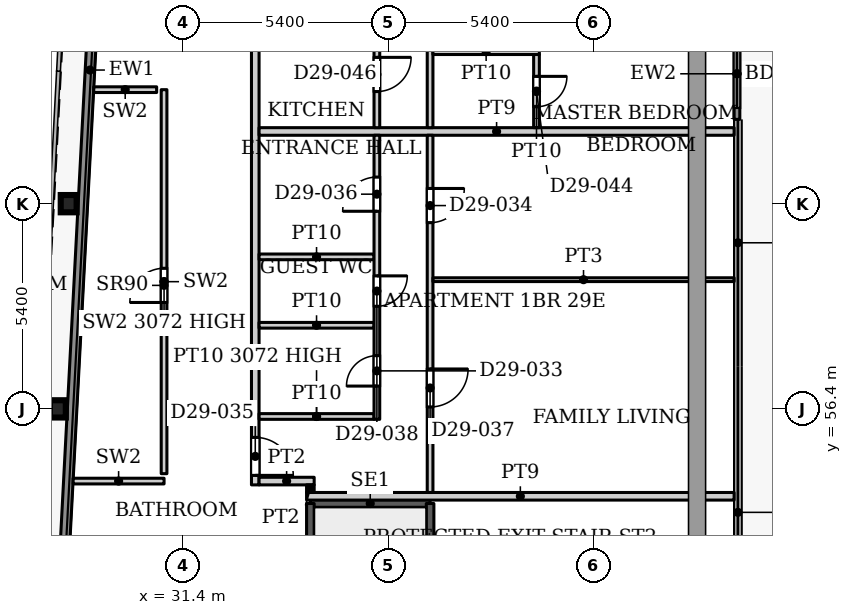
"""IFC4 building model, lengths in metres.
Left out: names, types, materials, properties, quantities, classifications, styles, units other than length and angle.
Written with IfcOpenShell. Run it as: python <this file> out.ifc"""

import sys

from ifc_helpers import new_model, si_unit, direction, frame, frame_2d, origin, origin_2d, place, context, subcontext, project, spatial, rectangle, i_section, extrude, source, transform, mapped, element, fill, save


model = new_model("IFC4")
c1 = context("Model", 3, precision=1e-05, world=origin(), true_north=direction((0.0, 1.0)))
c2 = subcontext(c1, "Body", "Model", "MODEL_VIEW")
j1 = project(units=[si_unit("LENGTHUNIT", "METRE"), si_unit("PLANEANGLEUNIT", "RADIAN")], contexts=[c1])
p1 = place(None, origin())
s1 = spatial("IfcSite", under=j1, at=p1, CompositionType="ELEMENT")
p2 = place(p1, origin())
s2 = spatial("IfcBuilding", under=s1, at=p2, CompositionType="ELEMENT")
p3 = place(p2, frame((0.0, 0.0, 125.3)))
s3 = spatial("IfcBuildingStorey", under=s2, at=p3, CompositionType="ELEMENT", Elevation=125.3)
for number, where, z_axis, x_axis in (
    (1, (28.106, 56.4, 0.0), (0.0, 0.0, 1.0), (1.0, 0.0, 0.0)),
    (2, (28.39, 61.8, 0.0), (0.0, 0.0, 1.0), (1.0, 0.0, 0.0)),
):
    element("IfcColumn", number, at=place(p3, frame(where, z_axis=z_axis, x_axis=x_axis)), inside=s3, PredefinedType="COLUMN", context=c2, shape_type="SweptSolid", body=[
        extrude(i_section(OverallWidth=0.418, OverallDepth=0.455, WebThickness=0.042, FlangeThickness=0.068, FilletRadius=0.014, at=origin_2d()), origin(), (0.0, 0.0, 1.0), 3.9),
    ])
p4 = place(p3, frame((27.195, 31.969, 0.0), z_axis=(0.0, 0.0, 1.0), x_axis=(0.052554995867, 0.998618031286, 0.0)))
e3 = element("IfcWall", 3, at=p4, inside=s3, PredefinedType="SOLIDWALL", context=c2, shape_type="SweptSolid", body=[
    extrude(rectangle(XDim=66.787, YDim=0.25, at=frame_2d((33.394, 0.0))), origin(), (0.0, 0.0, 1.0), 3.75),
])
p5 = place(p3, frame((45.975, 66.418, 0.0), z_axis=(0.0, 0.0, 1.0), x_axis=(0.0, -1.0, 0.0)))
e4 = element("IfcWall", 4, at=p5, inside=s3, PredefinedType="SOLIDWALL", context=c2, shape_type="SweptSolid", body=[
    extrude(rectangle(XDim=2.4, YDim=0.15, at=frame_2d((1.2, 0.0))), origin(), (0.0, 0.0, 1.0), 3.75),
])
p6 = place(p5, frame((0.3, 0.0, 0.0)))
e5 = element("IfcOpeningElement", 5, at=p6, cuts=e4, PredefinedType="OPENING", context=c2, shape_type="SweptSolid", body=[
    extrude(rectangle(XDim=1.8, YDim=2.4, at=frame_2d((0.9, 1.2))), frame((0.0, 0.085, 0.0), z_axis=(0.0, -1.0, 0.0), x_axis=(1.0, 0.0, 0.0)), (0.0, 0.0, 1.0), 0.17),
])
p7 = place(p3, frame((34.75, 53.91, 0.0), z_axis=(0.0, 0.0, 1.0), x_axis=(1.0, 0.0, 0.0)))
e6 = element("IfcWall", 6, at=p7, inside=s3, PredefinedType="SHEAR", context=c2, shape_type="SweptSolid", body=[
    extrude(rectangle(XDim=3.15, YDim=0.2, at=frame_2d((1.575, 0.0))), origin(), (0.0, 0.0, 1.0), 3.9),
])
p8 = place(p3, frame((34.75, 47.5, 0.0), z_axis=(0.0, 0.0, 1.0), x_axis=(0.0, 1.0, 0.0)))
e7 = element("IfcWall", 7, at=p8, inside=s3, PredefinedType="SHEAR", context=c2, shape_type="SweptSolid", body=[
    extrude(rectangle(XDim=6.41, YDim=0.2, at=frame_2d((3.205, 0.0))), origin(), (0.0, 0.0, 1.0), 3.9),
])
p9 = place(p3, frame((37.9, 44.75, 0.0), z_axis=(0.0, 0.0, 1.0), x_axis=(0.0, 1.0, 0.0)))
e8 = element("IfcWall", 8, at=p9, inside=s3, PredefinedType="SHEAR", context=c2, shape_type="SweptSolid", body=[
    extrude(rectangle(XDim=9.16, YDim=0.2, at=frame_2d((4.58, 0.0))), origin(), (0.0, 0.0, 1.0), 3.9),
])
p10 = place(p3, frame((28.508, 54.5, 0.0), z_axis=(0.0, 0.0, 1.0), x_axis=(1.0, 0.0, 0.0)))
e9 = element("IfcWall", 9, at=p10, inside=s3, PredefinedType="PARTITIONING", context=c2, shape_type="SweptSolid", body=[
    extrude(rectangle(XDim=2.392, YDim=0.15, at=frame_2d((1.196, 0.0))), origin(), (0.0, 0.0, 1.0), 3.9),
])
p11 = place(p3, frame((30.9, 54.695, 0.0), z_axis=(0.0, 0.0, 1.0), x_axis=(0.0, 1.0, 0.0)))
e10 = element("IfcWall", 10, at=p11, inside=s3, PredefinedType="PARTITIONING", context=c2, shape_type="SweptSolid", body=[
    extrude(rectangle(XDim=10.105, YDim=0.15, at=frame_2d((5.052, 0.0))), origin(), (0.0, 0.0, 1.0), 3.072),
])
p12 = place(p11, frame((4.505, 0.0, 0.0)))
e11 = element("IfcOpeningElement", 11, at=p12, cuts=e10, PredefinedType="OPENING", context=c2, shape_type="SweptSolid", body=[
    extrude(rectangle(XDim=0.9, YDim=2.2, at=frame_2d((0.45, 1.1))), frame((0.0, 0.085, 0.0), z_axis=(0.0, -1.0, 0.0), x_axis=(1.0, 0.0, 0.0)), (0.0, 0.0, 1.0), 0.17),
])
p13 = place(p3, frame((29.05, 64.8, 0.0), z_axis=(0.0, 0.0, 1.0), x_axis=(1.0, 0.0, 0.0)))
e12 = element("IfcWall", 12, at=p13, inside=s3, PredefinedType="PARTITIONING", context=c2, shape_type="SweptSolid", body=[
    extrude(rectangle(XDim=1.655, YDim=0.15, at=frame_2d((0.828, 0.0))), origin(), (0.0, 0.0, 1.0), 3.9),
])
p14 = place(p3, frame((33.3, 54.4, 0.0), z_axis=(0.0, 0.0, 1.0), x_axis=(0.0, 1.0, 0.0)))
e13 = element("IfcWall", 13, at=p14, inside=s3, PredefinedType="PARTITIONING", context=c2, shape_type="SweptSolid", body=[
    extrude(rectangle(XDim=24.95, YDim=0.2, at=frame_2d((12.475, 0.0))), origin(), (0.0, 0.0, 1.0), 3.6),
])
p15 = place(p14, frame((0.25, 0.0, 0.0)))
e14 = element("IfcOpeningElement", 14, at=p15, cuts=e13, PredefinedType="OPENING", context=c2, shape_type="SweptSolid", body=[
    extrude(rectangle(XDim=1.0, YDim=2.1, at=frame_2d((0.5, 1.05))), frame((0.0, 0.11, 0.0), z_axis=(0.0, -1.0, 0.0), x_axis=(1.0, 0.0, 0.0)), (0.0, 0.0, 1.0), 0.22),
])
p16 = place(p14, frame((20.5, 0.0, 0.0)))
e15 = element("IfcOpeningElement", 15, at=p16, cuts=e13, PredefinedType="OPENING", context=c2, shape_type="SweptSolid", body=[
    extrude(rectangle(XDim=1.0, YDim=2.1, at=frame_2d((0.5, 1.05))), frame((0.0, 0.11, 0.0), z_axis=(0.0, -1.0, 0.0), x_axis=(1.0, 0.0, 0.0)), (0.0, 0.0, 1.0), 0.22),
])
p17 = place(p3, frame((33.4, 54.5, 0.0), z_axis=(0.0, 0.0, 1.0), x_axis=(1.0, 0.0, 0.0)))
e16 = element("IfcWall", 16, at=p17, inside=s3, PredefinedType="PARTITIONING", context=c2, shape_type="SweptSolid", body=[
    extrude(rectangle(XDim=1.45, YDim=0.2, at=frame_2d((0.725, 0.0))), origin(), (0.0, 0.0, 1.0), 3.6),
])
p18 = place(p3, frame((33.4, 56.2, 0.0), z_axis=(0.0, 0.0, 1.0), x_axis=(1.0, 0.0, 0.0)))
e17 = element("IfcWall", 17, at=p18, inside=s3, PredefinedType="PARTITIONING", context=c2, shape_type="SweptSolid", body=[
    extrude(rectangle(XDim=3.025, YDim=0.15, at=frame_2d((1.513, 0.0))), origin(), (0.0, 0.0, 1.0), 3.072),
])
for number, where, z_axis, x_axis in (
    (18, (33.4, 58.6, 0.0), (0.0, 0.0, 1.0), (1.0, 0.0, 0.0)),
    (19, (33.4, 60.4, 0.0), (0.0, 0.0, 1.0), (1.0, 0.0, 0.0)),
):
    element("IfcWall", number, at=place(p3, frame(where, z_axis=z_axis, x_axis=x_axis)), inside=s3, PredefinedType="PARTITIONING", context=c2, shape_type="SweptSolid", body=[
        extrude(rectangle(XDim=3.025, YDim=0.15, at=frame_2d((1.513, 0.0))), origin(), (0.0, 0.0, 1.0), 3.6),
    ])
p19 = place(p3, frame((33.4, 63.7, 0.0), z_axis=(0.0, 0.0, 1.0), x_axis=(1.0, 0.0, 0.0)))
e20 = element("IfcWall", 20, at=p19, inside=s3, PredefinedType="PARTITIONING", context=c2, shape_type="SweptSolid", body=[
    extrude(rectangle(XDim=12.5, YDim=0.2, at=frame_2d((6.25, 0.0))), origin(), (0.0, 0.0, 1.0), 3.6),
])
p20 = place(p3, frame((34.65, 54.1, 0.0), z_axis=(0.0, 0.0, 1.0), x_axis=(1.0, 0.0, 0.0)))
e21 = element("IfcWall", 21, at=p20, inside=s3, PredefinedType="PARTITIONING", context=c2, shape_type="SweptSolid", body=[
    extrude(rectangle(XDim=11.25, YDim=0.2, at=frame_2d((5.625, 0.0))), origin(), (0.0, 0.0, 1.0), 3.6),
])
p21 = place(p3, frame((34.75, 54.2, 0.0), z_axis=(0.0, 0.0, 1.0), x_axis=(0.0, 1.0, 0.0)))
e22 = element("IfcWall", 22, at=p21, inside=s3, PredefinedType="PARTITIONING", context=c2, shape_type="SweptSolid", body=[
    extrude(rectangle(XDim=0.2, YDim=0.2, at=frame_2d((0.1, 0.0))), origin(), (0.0, 0.0, 1.0), 3.6),
])
p22 = place(p3, frame((36.5, 56.125, 0.0), z_axis=(0.0, 0.0, 1.0), x_axis=(0.0, 1.0, 0.0)))
e23 = element("IfcWall", 23, at=p22, inside=s3, PredefinedType="PARTITIONING", context=c2, shape_type="SweptSolid", body=[
    extrude(rectangle(XDim=7.475, YDim=0.15, at=frame_2d((3.738, 0.0))), origin(), (0.0, 0.0, 1.0), 3.6),
])
p23 = place(p22, frame((0.875, 0.0, 0.0)))
e24 = element("IfcOpeningElement", 24, at=p23, cuts=e23, PredefinedType="OPENING", context=c2, shape_type="SweptSolid", body=[
    extrude(rectangle(XDim=0.8, YDim=2.1, at=frame_2d((0.4, 1.05))), frame((0.0, 0.085, 0.0), z_axis=(0.0, -1.0, 0.0), x_axis=(1.0, 0.0, 0.0)), (0.0, 0.0, 1.0), 0.17),
])
p24 = place(p22, frame((5.475, 0.0, 0.0)))
e25 = element("IfcOpeningElement", 25, at=p24, cuts=e23, PredefinedType="OPENING", context=c2, shape_type="SweptSolid", body=[
    extrude(rectangle(XDim=0.9, YDim=2.1, at=frame_2d((0.45, 1.05))), frame((0.0, 0.085, 0.0), z_axis=(0.0, -1.0, 0.0), x_axis=(1.0, 0.0, 0.0)), (0.0, 0.0, 1.0), 0.17),
])
p25 = place(p22, frame((2.975, 0.0, 0.0)))
e26 = element("IfcOpeningElement", 26, at=p25, cuts=e23, PredefinedType="OPENING", context=c2, shape_type="SweptSolid", body=[
    extrude(rectangle(XDim=0.8, YDim=2.1, at=frame_2d((0.4, 1.05))), frame((0.0, 0.085, 0.0), z_axis=(0.0, -1.0, 0.0), x_axis=(1.0, 0.0, 0.0)), (0.0, 0.0, 1.0), 0.17),
])
p26 = place(p3, frame((36.5, 63.8, 0.0), z_axis=(0.0, 0.0, 1.0), x_axis=(0.0, 1.0, 0.0)))
e27 = element("IfcWall", 27, at=p26, inside=s3, PredefinedType="PARTITIONING", context=c2, shape_type="SweptSolid", body=[
    extrude(rectangle(XDim=10.75, YDim=0.15, at=frame_2d((5.375, 0.0))), origin(), (0.0, 0.0, 1.0), 3.6),
])
p27 = place(p26, frame((3.55, 0.0, 0.0)))
e28 = element("IfcOpeningElement", 28, at=p27, cuts=e27, PredefinedType="OPENING", context=c2, shape_type="SweptSolid", body=[
    extrude(rectangle(XDim=0.8, YDim=2.1, at=frame_2d((0.4, 1.05))), frame((0.0, 0.085, 0.0), z_axis=(0.0, -1.0, 0.0), x_axis=(1.0, 0.0, 0.0)), (0.0, 0.0, 1.0), 0.17),
])
p28 = place(p26, frame((5.65, 0.0, 0.0)))
e29 = element("IfcOpeningElement", 29, at=p28, cuts=e27, PredefinedType="OPENING", context=c2, shape_type="SweptSolid", body=[
    extrude(rectangle(XDim=0.8, YDim=2.1, at=frame_2d((0.4, 1.05))), frame((0.0, 0.085, 0.0), z_axis=(0.0, -1.0, 0.0), x_axis=(1.0, 0.0, 0.0)), (0.0, 0.0, 1.0), 0.17),
])
p29 = place(p26, frame((9.25, 0.0, 0.0)))
e30 = element("IfcOpeningElement", 30, at=p29, cuts=e27, PredefinedType="OPENING", context=c2, shape_type="SweptSolid", body=[
    extrude(rectangle(XDim=0.8, YDim=2.1, at=frame_2d((0.4, 1.05))), frame((0.0, 0.085, 0.0), z_axis=(0.0, -1.0, 0.0), x_axis=(1.0, 0.0, 0.0)), (0.0, 0.0, 1.0), 0.17),
])
p30 = place(p26, frame((0.95, 0.0, 0.0)))
e31 = element("IfcOpeningElement", 31, at=p30, cuts=e27, PredefinedType="OPENING", context=c2, shape_type="SweptSolid", body=[
    extrude(rectangle(XDim=0.9, YDim=2.1, at=frame_2d((0.45, 1.05))), frame((0.0, 0.085, 0.0), z_axis=(0.0, -1.0, 0.0), x_axis=(1.0, 0.0, 0.0)), (0.0, 0.0, 1.0), 0.17),
])
p31 = place(p26, frame((7.45, 0.0, 0.0)))
e32 = element("IfcOpeningElement", 32, at=p31, cuts=e27, PredefinedType="OPENING", context=c2, shape_type="SweptSolid", body=[
    extrude(rectangle(XDim=0.8, YDim=2.1, at=frame_2d((0.4, 1.05))), frame((0.0, 0.085, 0.0), z_axis=(0.0, -1.0, 0.0), x_axis=(1.0, 0.0, 0.0)), (0.0, 0.0, 1.0), 0.17),
])
p32 = place(p3, frame((37.9, 54.2, 0.0), z_axis=(0.0, 0.0, 1.0), x_axis=(0.0, 1.0, 0.0)))
e33 = element("IfcWall", 33, at=p32, inside=s3, PredefinedType="PARTITIONING", context=c2, shape_type="SweptSolid", body=[
    extrude(rectangle(XDim=9.4, YDim=0.15, at=frame_2d((4.7, 0.0))), origin(), (0.0, 0.0, 1.0), 3.6),
])
p33 = place(p32, frame((7.1, 0.0, 0.0)))
e34 = element("IfcOpeningElement", 34, at=p33, cuts=e33, PredefinedType="OPENING", context=c2, shape_type="SweptSolid", body=[
    extrude(rectangle(XDim=0.9, YDim=2.1, at=frame_2d((0.45, 1.05))), frame((0.0, 0.085, 0.0), z_axis=(0.0, -1.0, 0.0), x_axis=(1.0, 0.0, 0.0)), (0.0, 0.0, 1.0), 0.17),
])
p34 = place(p32, frame((2.25, 0.0, 0.0)))
e35 = element("IfcOpeningElement", 35, at=p34, cuts=e33, PredefinedType="OPENING", context=c2, shape_type="SweptSolid", body=[
    extrude(rectangle(XDim=1.0, YDim=2.1, at=frame_2d((0.5, 1.05))), frame((0.0, 0.085, 0.0), z_axis=(0.0, -1.0, 0.0), x_axis=(1.0, 0.0, 0.0)), (0.0, 0.0, 1.0), 0.17),
])
p35 = place(p3, frame((37.9, 63.8, 0.0), z_axis=(0.0, 0.0, 1.0), x_axis=(0.0, 1.0, 0.0)))
e36 = element("IfcWall", 36, at=p35, inside=s3, PredefinedType="PARTITIONING", context=c2, shape_type="SweptSolid", body=[
    extrude(rectangle(XDim=15.45, YDim=0.15, at=frame_2d((7.725, 0.0))), origin(), (0.0, 0.0, 1.0), 3.6),
])
p36 = place(p35, frame((11.0, 0.0, 0.0)))
e37 = element("IfcOpeningElement", 37, at=p36, cuts=e36, PredefinedType="OPENING", context=c2, shape_type="SweptSolid", body=[
    extrude(rectangle(XDim=0.9, YDim=2.1, at=frame_2d((0.45, 1.05))), frame((0.0, 0.085, 0.0), z_axis=(0.0, -1.0, 0.0), x_axis=(1.0, 0.0, 0.0)), (0.0, 0.0, 1.0), 0.17),
])
p37 = place(p35, frame((13.7, 0.0, 0.0)))
e38 = element("IfcOpeningElement", 38, at=p37, cuts=e36, PredefinedType="OPENING", context=c2, shape_type="SweptSolid", body=[
    extrude(rectangle(XDim=0.9, YDim=2.1, at=frame_2d((0.45, 1.05))), frame((0.0, 0.085, 0.0), z_axis=(0.0, -1.0, 0.0), x_axis=(1.0, 0.0, 0.0)), (0.0, 0.0, 1.0), 0.17),
])
p38 = place(p35, frame((4.65, 0.0, 0.0)))
e39 = element("IfcOpeningElement", 39, at=p38, cuts=e36, PredefinedType="OPENING", context=c2, shape_type="SweptSolid", body=[
    extrude(rectangle(XDim=1.0, YDim=2.1, at=frame_2d((0.5, 1.05))), frame((0.0, 0.085, 0.0), z_axis=(0.0, -1.0, 0.0), x_axis=(1.0, 0.0, 0.0)), (0.0, 0.0, 1.0), 0.17),
])
p39 = place(p35, frame((7.65, 0.0, 0.0)))
e40 = element("IfcOpeningElement", 40, at=p39, cuts=e36, PredefinedType="OPENING", context=c2, shape_type="SweptSolid", body=[
    extrude(rectangle(XDim=1.6, YDim=2.1, at=frame_2d((0.8, 1.05))), frame((0.0, 0.085, 0.0), z_axis=(0.0, -1.0, 0.0), x_axis=(1.0, 0.0, 0.0)), (0.0, 0.0, 1.0), 0.17),
])
p40 = place(p35, frame((2.3, 0.0, 0.0)))
e41 = element("IfcOpeningElement", 41, at=p40, cuts=e36, PredefinedType="OPENING", context=c2, shape_type="SweptSolid", body=[
    extrude(rectangle(XDim=0.9, YDim=2.1, at=frame_2d((0.45, 1.05))), frame((0.0, 0.085, 0.0), z_axis=(0.0, -1.0, 0.0), x_axis=(1.0, 0.0, 0.0)), (0.0, 0.0, 1.0), 0.17),
])
p41 = place(p3, frame((37.975, 59.8, 0.0), z_axis=(0.0, 0.0, 1.0), x_axis=(1.0, 0.0, 0.0)))
e42 = element("IfcWall", 42, at=p41, inside=s3, PredefinedType="PARTITIONING", context=c2, shape_type="SweptSolid", body=[
    extrude(rectangle(XDim=7.925, YDim=0.1, at=frame_2d((3.962, 0.0))), origin(), (0.0, 0.0, 1.0), 3.6),
])
p42 = place(p3, frame((37.975, 65.8, 0.0), z_axis=(0.0, 0.0, 1.0), x_axis=(1.0, 0.0, 0.0)))
e43 = element("IfcWall", 43, at=p42, inside=s3, PredefinedType="PARTITIONING", context=c2, shape_type="SweptSolid", body=[
    extrude(rectangle(XDim=2.8, YDim=0.15, at=frame_2d((1.4, 0.0))), origin(), (0.0, 0.0, 1.0), 3.6),
])
p43 = place(p3, frame((40.7, 63.8, 0.0), z_axis=(0.0, 0.0, 1.0), x_axis=(0.0, 1.0, 0.0)))
e44 = element("IfcWall", 44, at=p43, inside=s3, PredefinedType="PARTITIONING", context=c2, shape_type="SweptSolid", body=[
    extrude(rectangle(XDim=1.925, YDim=0.15, at=frame_2d((0.962, 0.0))), origin(), (0.0, 0.0, 1.0), 3.6),
])
p44 = place(p43, frame((0.55, 0.0, 0.0)))
e45 = element("IfcOpeningElement", 45, at=p44, cuts=e44, PredefinedType="OPENING", context=c2, shape_type="SweptSolid", body=[
    extrude(rectangle(XDim=0.8, YDim=2.1, at=frame_2d((0.4, 1.05))), frame((0.0, 0.085, 0.0), z_axis=(0.0, -1.0, 0.0), x_axis=(1.0, 0.0, 0.0)), (0.0, 0.0, 1.0), 0.17),
])
m1 = source(origin(), c2, "Body", "SweptSolid", [
    extrude(rectangle(XDim=1.8, YDim=2.4, at=frame_2d((0.9, 1.2))), frame((0.0, 0.025, 0.0), z_axis=(0.0, -1.0, 0.0), x_axis=(1.0, 0.0, 0.0)), (0.0, 0.0, 1.0), 0.05),
])
p45 = place(p6, origin())
e46 = element("IfcDoor", 46, at=p45, inside=s3, OperationType="SLIDING_TO_LEFT", PredefinedType="DOOR", context=c2, shape_type="MappedRepresentation", body=[
    mapped(m1, transform((0.0, 0.0, 0.0), x_axis=(1.0, 0.0, 0.0), y_axis=(0.0, 1.0, 0.0), z_axis=(0.0, 0.0, 1.0), scale=1.0)),
])
fill(e5, e46)
m2 = source(origin(), c2, "Body", "SweptSolid", [
    extrude(rectangle(XDim=0.9, YDim=2.2, at=frame_2d((0.45, 1.1))), frame((0.0, 0.025, 0.0), z_axis=(0.0, -1.0, 0.0), x_axis=(1.0, 0.0, 0.0)), (0.0, 0.0, 1.0), 0.05),
])
p46 = place(p12, origin())
e47 = element("IfcDoor", 47, at=p46, inside=s3, OperationType="SINGLE_SWING_LEFT", PredefinedType="DOOR", context=c2, shape_type="MappedRepresentation", body=[
    mapped(m2, transform((0.0, 0.0, 0.0), x_axis=(1.0, 0.0, 0.0), y_axis=(0.0, 1.0, 0.0), z_axis=(0.0, 0.0, 1.0), scale=1.0)),
])
fill(e11, e47)
m3 = source(origin(), c2, "Body", "SweptSolid", [
    extrude(rectangle(XDim=0.8, YDim=2.1, at=frame_2d((0.4, 1.05))), frame((0.0, 0.025, 0.0), z_axis=(0.0, -1.0, 0.0), x_axis=(1.0, 0.0, 0.0)), (0.0, 0.0, 1.0), 0.05),
])
p47 = place(p23, origin())
e48 = element("IfcDoor", 48, at=p47, inside=s3, OperationType="SINGLE_SWING_LEFT", PredefinedType="DOOR", context=c2, shape_type="MappedRepresentation", body=[
    mapped(m3, transform((0.0, 0.0, 0.0), x_axis=(1.0, 0.0, 0.0), y_axis=(0.0, 1.0, 0.0), z_axis=(0.0, 0.0, 1.0), scale=1.0)),
])
fill(e24, e48)
m4 = source(origin(), c2, "Body", "SweptSolid", [
    extrude(rectangle(XDim=0.9, YDim=2.1, at=frame_2d((0.45, 1.05))), frame((0.0, 0.025, 0.0), z_axis=(0.0, -1.0, 0.0), x_axis=(1.0, 0.0, 0.0)), (0.0, 0.0, 1.0), 0.05),
])
p48 = place(p33, origin())
e49 = element("IfcDoor", 49, at=p48, inside=s3, OperationType="SINGLE_SWING_RIGHT", PredefinedType="DOOR", context=c2, shape_type="MappedRepresentation", body=[
    mapped(m4, transform((0.0, 0.0, 0.0), x_axis=(1.0, 0.0, 0.0), y_axis=(0.0, 1.0, 0.0), z_axis=(0.0, 0.0, 1.0), scale=1.0)),
])
fill(e34, e49)
m5 = source(origin(), c2, "Body", "SweptSolid", [
    extrude(rectangle(XDim=1.0, YDim=2.1, at=frame_2d((0.5, 1.05))), frame((0.0, 0.025, 0.0), z_axis=(0.0, -1.0, 0.0), x_axis=(1.0, 0.0, 0.0)), (0.0, 0.0, 1.0), 0.05),
])
p49 = place(p15, origin())
e50 = element("IfcDoor", 50, at=p49, inside=s3, OperationType="SINGLE_SWING_RIGHT", PredefinedType="DOOR", context=c2, shape_type="MappedRepresentation", body=[
    mapped(m5, transform((0.0, 0.0, 0.0), x_axis=(1.0, 0.0, 0.0), y_axis=(0.0, 1.0, 0.0), z_axis=(0.0, 0.0, 1.0), scale=1.0)),
])
fill(e14, e50)
p50 = place(p24, origin())
e51 = element("IfcDoor", 51, at=p50, inside=s3, OperationType="SINGLE_SWING_LEFT", PredefinedType="DOOR", context=c2, shape_type="MappedRepresentation", body=[
    mapped(m4, transform((0.0, 0.0, 0.0), x_axis=(1.0, 0.0, 0.0), y_axis=(0.0, 1.0, 0.0), z_axis=(0.0, 0.0, 1.0), scale=1.0)),
])
fill(e25, e51)
m6 = source(origin(), c2, "Body", "SweptSolid", [
    extrude(rectangle(XDim=1.0, YDim=2.1, at=frame_2d((0.5, 1.05))), frame((0.0, 0.025, 0.0), z_axis=(0.0, -1.0, 0.0), x_axis=(1.0, 0.0, 0.0)), (0.0, 0.0, 1.0), 0.05),
])
p51 = place(p34, origin())
e52 = element("IfcDoor", 52, at=p51, inside=s3, OperationType="SINGLE_SWING_RIGHT", PredefinedType="DOOR", context=c2, shape_type="MappedRepresentation", body=[
    mapped(m6, transform((0.0, 0.0, 0.0), x_axis=(1.0, 0.0, 0.0), y_axis=(0.0, 1.0, 0.0), z_axis=(0.0, 0.0, 1.0), scale=1.0)),
])
fill(e35, e52)
p52 = place(p25, origin())
e53 = element("IfcDoor", 53, at=p52, inside=s3, OperationType="SINGLE_SWING_RIGHT", PredefinedType="DOOR", context=c2, shape_type="MappedRepresentation", body=[
    mapped(m3, transform((0.0, 0.0, 0.0), x_axis=(1.0, 0.0, 0.0), y_axis=(0.0, 1.0, 0.0), z_axis=(0.0, 0.0, 1.0), scale=1.0)),
])
fill(e26, e53)
p53 = place(p44, origin())
e54 = element("IfcDoor", 54, at=p53, inside=s3, OperationType="SINGLE_SWING_RIGHT", PredefinedType="DOOR", context=c2, shape_type="MappedRepresentation", body=[
    mapped(m3, transform((0.0, 0.0, 0.0), x_axis=(1.0, 0.0, 0.0), y_axis=(0.0, 1.0, 0.0), z_axis=(0.0, 0.0, 1.0), scale=1.0)),
])
fill(e45, e54)
p54 = place(p30, origin())
e55 = element("IfcDoor", 55, at=p54, inside=s3, OperationType="SINGLE_SWING_RIGHT", PredefinedType="DOOR", context=c2, shape_type="MappedRepresentation", body=[
    mapped(m4, transform((0.0, 0.0, 0.0), x_axis=(1.0, 0.0, 0.0), y_axis=(0.0, 1.0, 0.0), z_axis=(0.0, 0.0, 1.0), scale=1.0)),
])
fill(e31, e55)
save(model, sys.argv[1])
